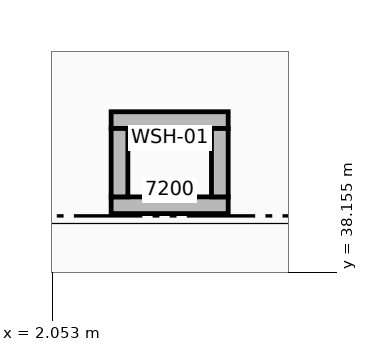
"""IFC4 building model, lengths in metres.
Left out: names, types, materials, properties, quantities, classifications, styles, units other than length and angle.
Written with IfcOpenShell. Run it as: python <this file> out.ifc"""

import sys

from ifc_helpers import new_model, si_unit, direction, frame, frame_2d, origin, place, context, subcontext, project, spatial, rectangle, extrude, element, save


model = new_model("IFC4")
c1 = context("Model", 3, precision=1e-05, world=origin(), true_north=direction((0.0, 1.0)))
c2 = subcontext(c1, "Body", "Model", "MODEL_VIEW")
j1 = project(units=[si_unit("LENGTHUNIT", "METRE"), si_unit("PLANEANGLEUNIT", "RADIAN")], contexts=[c1])
p1 = place(None, origin())
s1 = spatial("IfcSite", under=j1, at=p1, CompositionType="ELEMENT")
p2 = place(p1, origin())
s2 = spatial("IfcBuilding", under=s1, at=p2, CompositionType="ELEMENT")
p3 = place(p2, origin())
s3 = spatial("IfcBuildingStorey", under=s2, at=p3, CompositionType="ELEMENT", Elevation=0.0)
for number, where, z_axis, x_axis in (
    (1, (2.83, 39.04, 0.0), (0.0, 0.0, 1.0), (1.0, 0.0, 0.0)),
    (2, (2.83, 40.16, 0.0), (0.0, 0.0, 1.0), (1.0, 0.0, 0.0)),
):
    element("IfcWall", number, at=place(p3, frame(where, z_axis=z_axis, x_axis=x_axis)), inside=s3, PredefinedType="STANDARD", context=c2, shape_type="SweptSolid", body=[
        extrude(rectangle(XDim=1.54, YDim=0.22, at=frame_2d((0.77, 0.0))), origin(), (0.0, 0.0, 1.0), 2.6),
    ])
for number, where, z_axis, x_axis in (
    (3, (2.94, 39.15, 0.0), (0.0, 0.0, 1.0), (0.0, 1.0, 0.0)),
    (4, (4.26, 39.15, 0.0), (0.0, 0.0, 1.0), (0.0, 1.0, 0.0)),
):
    element("IfcWall", number, at=place(p3, frame(where, z_axis=z_axis, x_axis=x_axis)), inside=s3, PredefinedType="STANDARD", context=c2, shape_type="SweptSolid", body=[
        extrude(rectangle(XDim=0.9, YDim=0.22, at=frame_2d((0.45, 0.0))), origin(), (0.0, 0.0, 1.0), 2.6),
    ])
save(model, sys.argv[1])
